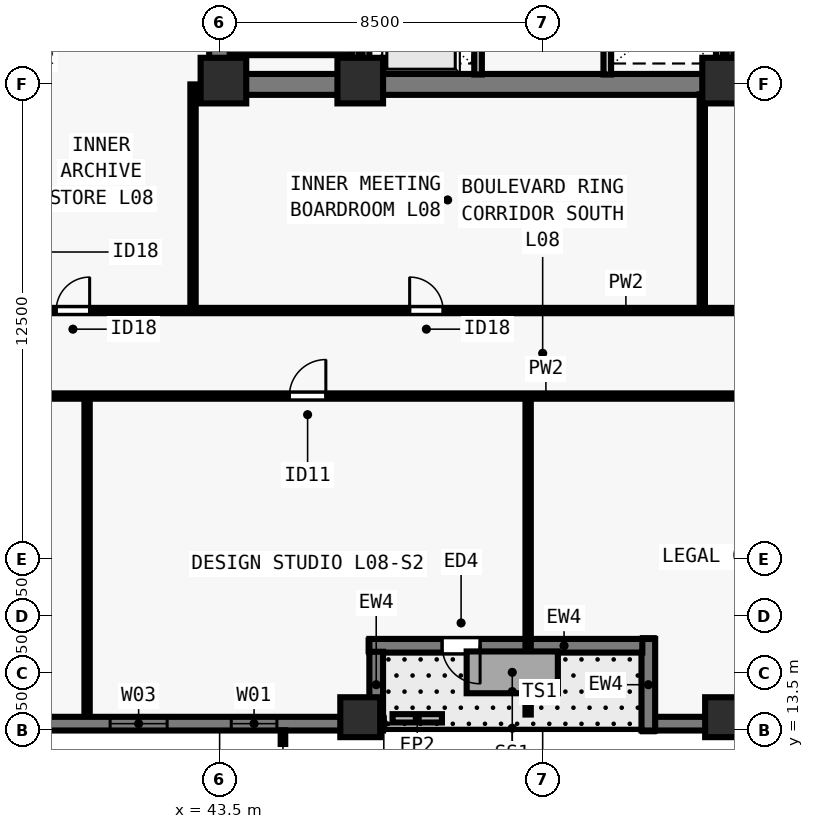
"""IFC4 building model, lengths in metres.
Left out: names, types, materials, properties, quantities, classifications, styles, units other than length and angle.
Written with IfcOpenShell. Run it as: python <this file> out.ifc"""

import sys

from ifc_helpers import new_model, si_unit, direction, frame, frame_2d, origin, origin_2d, place, context, subcontext, project, spatial, rectangle, extrude, element, fill, save


model = new_model("IFC4")
c1 = context("Model", 3, precision=1e-05, world=origin(), true_north=direction((0.0, 1.0)))
c2 = subcontext(c1, "Body", "Model", "MODEL_VIEW")
j1 = project(units=[si_unit("LENGTHUNIT", "METRE"), si_unit("PLANEANGLEUNIT", "RADIAN")], contexts=[c1])
p1 = place(None, origin())
s1 = spatial("IfcSite", under=j1, at=p1, CompositionType="ELEMENT")
p2 = place(p1, origin())
s2 = spatial("IfcBuilding", under=s1, at=p2, CompositionType="ELEMENT")
p3 = place(p2, frame((0.0, 0.0, 34.0)))
s3 = spatial("IfcBuildingStorey", under=s2, at=p3, CompositionType="ELEMENT", Elevation=34.0)
for number, where, z_axis, x_axis in (
    (1, (43.6, 30.6, 0.0), (0.0, 0.0, 1.0), (1.0, 0.0, 0.0)),
    (2, (47.2, 30.6, 0.0), (0.0, 0.0, 1.0), (1.0, 0.0, 0.0)),
    (3, (56.8, 30.6, 0.0), (0.0, 0.0, 1.0), (1.0, 0.0, 0.0)),
):
    element("IfcColumn", number, at=place(p3, frame(where, z_axis=z_axis, x_axis=x_axis)), inside=s3, PredefinedType="COLUMN", context=c2, shape_type="SweptSolid", body=[
        extrude(rectangle(XDim=1.2, YDim=1.2, at=origin_2d()), origin(), (0.0, 0.0, 1.0), 3.5),
    ])
for number, where, z_axis, x_axis in (
    (4, (47.2, 13.85, 0.0), (0.0, 0.0, 1.0), (1.0, 0.0, 0.0)),
    (5, (56.8, 13.85, 0.0), (0.0, 0.0, 1.0), (1.0, 0.0, 0.0)),
):
    element("IfcColumn", number, at=place(p3, frame(where, z_axis=z_axis, x_axis=x_axis)), inside=s3, PredefinedType="COLUMN", context=c2, shape_type="SweptSolid", body=[
        extrude(rectangle(XDim=1.05, YDim=1.05, at=origin_2d()), origin(), (0.0, 0.0, 1.0), 3.5),
    ])
p4 = place(p3, frame((47.8, 13.68, 0.0), z_axis=(0.0, 0.0, 1.0), x_axis=(-1.0, 0.0, 0.0)))
e6 = element("IfcWall", 6, at=p4, inside=s3, PredefinedType="SOLIDWALL", context=c2, shape_type="SweptSolid", body=[
    extrude(rectangle(XDim=17.962, YDim=0.36, at=frame_2d((8.981, 0.0))), origin(), (0.0, 0.0, 1.0), 3.28),
])
p5 = place(p4, frame((2.794, 0.0, 0.8)))
e7 = element("IfcOpeningElement", 7, at=p5, cuts=e6, PredefinedType="OPENING", context=c2, shape_type="SweptSolid", body=[
    extrude(rectangle(XDim=1.2, YDim=1.544, at=frame_2d((0.6, 0.772))), frame((0.0, 0.19, 0.0), z_axis=(0.0, -1.0, 0.0), x_axis=(1.0, 0.0, 0.0)), (0.0, 0.0, 1.0), 0.38),
])
p6 = place(p4, frame((5.681, 0.0, 0.8)))
e8 = element("IfcOpeningElement", 8, at=p6, cuts=e6, PredefinedType="OPENING", context=c2, shape_type="SweptSolid", body=[
    extrude(rectangle(XDim=1.5, YDim=1.544, at=frame_2d((0.75, 0.772))), frame((0.0, 0.19, 0.0), z_axis=(0.0, -1.0, 0.0), x_axis=(1.0, 0.0, 0.0)), (0.0, 0.0, 1.0), 0.38),
])
p7 = place(p4, frame((11.368, 0.0, 0.8)))
e9 = element("IfcOpeningElement", 9, at=p7, cuts=e6, PredefinedType="OPENING", context=c2, shape_type="SweptSolid", body=[
    extrude(rectangle(XDim=1.2, YDim=1.544, at=frame_2d((0.6, 0.772))), frame((0.0, 0.19, 0.0), z_axis=(0.0, -1.0, 0.0), x_axis=(1.0, 0.0, 0.0)), (0.0, 0.0, 1.0), 0.38),
])
p8 = place(p3, frame((74.5, 13.68, 0.0), z_axis=(0.0, 0.0, 1.0), x_axis=(-1.0, 0.0, 0.0)))
e10 = element("IfcWall", 10, at=p8, inside=s3, PredefinedType="SOLIDWALL", context=c2, shape_type="SweptSolid", body=[
    extrude(rectangle(XDim=19.562, YDim=0.36, at=frame_2d((9.781, 0.0))), origin(), (0.0, 0.0, 1.0), 3.28),
])
p9 = place(p8, frame((5.058, 0.0, 0.8)))
e11 = element("IfcOpeningElement", 11, at=p9, cuts=e10, PredefinedType="OPENING", context=c2, shape_type="SweptSolid", body=[
    extrude(rectangle(XDim=1.2, YDim=1.544, at=frame_2d((0.6, 0.772))), frame((0.0, 0.19, 0.0), z_axis=(0.0, -1.0, 0.0), x_axis=(1.0, 0.0, 0.0)), (0.0, 0.0, 1.0), 0.38),
])
p10 = place(p8, frame((7.273, 0.0, 0.8)))
e12 = element("IfcOpeningElement", 12, at=p10, cuts=e10, PredefinedType="OPENING", context=c2, shape_type="SweptSolid", body=[
    extrude(rectangle(XDim=1.5, YDim=1.544, at=frame_2d((0.75, 0.772))), frame((0.0, 0.19, 0.0), z_axis=(0.0, -1.0, 0.0), x_axis=(1.0, 0.0, 0.0)), (0.0, 0.0, 1.0), 0.38),
])
p11 = place(p8, frame((12.289, 0.0, 0.8)))
e13 = element("IfcOpeningElement", 13, at=p11, cuts=e10, PredefinedType="OPENING", context=c2, shape_type="SweptSolid", body=[
    extrude(rectangle(XDim=1.2, YDim=1.544, at=frame_2d((0.6, 0.772))), frame((0.0, 0.19, 0.0), z_axis=(0.0, -1.0, 0.0), x_axis=(1.0, 0.0, 0.0)), (0.0, 0.0, 1.0), 0.38),
])
p12 = place(p8, frame((15.304, 0.0, 0.8)))
e14 = element("IfcOpeningElement", 14, at=p12, cuts=e10, PredefinedType="OPENING", context=c2, shape_type="SweptSolid", body=[
    extrude(rectangle(XDim=1.5, YDim=1.544, at=frame_2d((0.75, 0.772))), frame((0.0, 0.19, 0.0), z_axis=(0.0, -1.0, 0.0), x_axis=(1.0, 0.0, 0.0)), (0.0, 0.0, 1.0), 0.38),
])
p13 = place(p3, frame((54.78, 13.5, 0.0), z_axis=(0.0, 0.0, 1.0), x_axis=(0.0, 1.0, 0.0)))
e15 = element("IfcWall", 15, at=p13, inside=s3, PredefinedType="SOLIDWALL", context=c2, shape_type="SweptSolid", body=[
    extrude(rectangle(XDim=2.41, YDim=0.36, at=frame_2d((1.205, 0.0))), origin(), (0.0, 0.0, 1.0), 3.28),
])
p14 = place(p3, frame((54.622, 15.73, 0.0), z_axis=(0.0, 0.0, 1.0), x_axis=(-1.0, 0.0, 0.0)))
e16 = element("IfcWall", 16, at=p14, inside=s3, PredefinedType="SOLIDWALL", context=c2, shape_type="SweptSolid", body=[
    extrude(rectangle(XDim=7.182, YDim=0.36, at=frame_2d((3.591, 0.0))), origin(), (0.0, 0.0, 1.0), 3.28),
])
p15 = place(p14, frame((4.268, 0.0, 0.0)))
e17 = element("IfcOpeningElement", 17, at=p15, cuts=e16, PredefinedType="OPENING", context=c2, shape_type="SweptSolid", body=[
    extrude(rectangle(XDim=1.0, YDim=2.15, at=frame_2d((0.5, 1.075))), frame((0.0, 0.19, 0.0), z_axis=(0.0, -1.0, 0.0), x_axis=(1.0, 0.0, 0.0)), (0.0, 0.0, 1.0), 0.38),
])
p16 = place(p3, frame((47.62, 15.572, 0.0), z_axis=(0.0, 0.0, 1.0), x_axis=(0.0, -1.0, 0.0)))
e18 = element("IfcWall", 18, at=p16, inside=s3, PredefinedType="SOLIDWALL", context=c2, shape_type="SweptSolid", body=[
    extrude(rectangle(XDim=1.734, YDim=0.36, at=frame_2d((0.867, 0.0))), origin(), (0.0, 0.0, 1.0), 3.28),
])
p17 = place(p3, frame((48.05, 13.82, 0.0), z_axis=(0.0, 0.0, 1.0), x_axis=(1.0, 0.0, 0.0)))
e19 = element("IfcWall", 19, at=p17, inside=s3, PredefinedType="PARAPET", context=c2, shape_type="SweptSolid", body=[
    extrude(rectangle(XDim=1.3, YDim=0.22, at=frame_2d((0.65, 0.0))), origin(), (0.0, 0.0, 1.0), 0.55),
])
p18 = place(p3, frame((43.225, 30.5, 0.0), z_axis=(0.0, 0.0, 1.0), x_axis=(1.0, 0.0, 0.0)))
e20 = element("IfcWall", 20, at=p18, inside=s3, PredefinedType="SHEAR", context=c2, shape_type="SweptSolid", body=[
    extrude(rectangle(XDim=17.55, YDim=0.55, at=frame_2d((8.775, 0.0))), origin(), (0.0, 0.0, 1.0), 3.28),
])
p19 = place(p3, frame((43.5, 30.765, 0.0), z_axis=(0.0, 0.0, 1.0), x_axis=(0.0, 1.0, 0.0)))
e21 = element("IfcWall", 21, at=p19, inside=s3, PredefinedType="SHEAR", context=c2, shape_type="SweptSolid", body=[
    extrude(rectangle(XDim=7.985, YDim=0.55, at=frame_2d((3.993, 0.0))), origin(), (0.0, 0.0, 1.0), 3.28),
])
p20 = place(p3, frame((50.3, 30.76, 0.0), z_axis=(0.0, 0.0, 1.0), x_axis=(0.0, 1.0, 0.0)))
e22 = element("IfcWall", 22, at=p20, inside=s3, PredefinedType="SOLIDWALL", context=c2, shape_type="SweptSolid", body=[
    extrude(rectangle(XDim=7.855, YDim=0.2, at=frame_2d((3.927, 0.0))), origin(), (0.0, 0.0, 1.0), 3.28),
])
p21 = place(p20, frame((0.79, 0.0, 0.0)))
e23 = element("IfcOpeningElement", 23, at=p21, cuts=e22, PredefinedType="OPENING", context=c2, shape_type="SweptSolid", body=[
    extrude(rectangle(XDim=1.1, YDim=2.2, at=frame_2d((0.55, 1.1))), frame((0.0, 0.11, 0.0), z_axis=(0.0, -1.0, 0.0), x_axis=(1.0, 0.0, 0.0)), (0.0, 0.0, 1.0), 0.22),
])
p22 = place(p20, frame((3.49, 0.0, 0.0)))
e24 = element("IfcOpeningElement", 24, at=p22, cuts=e22, PredefinedType="OPENING", context=c2, shape_type="SweptSolid", body=[
    extrude(rectangle(XDim=1.1, YDim=2.2, at=frame_2d((0.55, 1.1))), frame((0.0, 0.11, 0.0), z_axis=(0.0, -1.0, 0.0), x_axis=(1.0, 0.0, 0.0)), (0.0, 0.0, 1.0), 0.22),
])
p23 = place(p20, frame((6.19, 0.0, 0.0)))
e25 = element("IfcOpeningElement", 25, at=p23, cuts=e22, PredefinedType="OPENING", context=c2, shape_type="SweptSolid", body=[
    extrude(rectangle(XDim=1.1, YDim=2.2, at=frame_2d((0.55, 1.1))), frame((0.0, 0.11, 0.0), z_axis=(0.0, -1.0, 0.0), x_axis=(1.0, 0.0, 0.0)), (0.0, 0.0, 1.0), 0.22),
])
p24 = place(p3, frame((53.7, 30.76, 0.0), z_axis=(0.0, 0.0, 1.0), x_axis=(0.0, 1.0, 0.0)))
e26 = element("IfcWall", 26, at=p24, inside=s3, PredefinedType="SOLIDWALL", context=c2, shape_type="SweptSolid", body=[
    extrude(rectangle(XDim=7.855, YDim=0.2, at=frame_2d((3.927, 0.0))), origin(), (0.0, 0.0, 1.0), 3.28),
])
for number, where, z_axis, x_axis in (
    (27, (47.35, 30.76, 0.0), (0.0, 0.0, 1.0), (0.0, 1.0, 0.0)),
    (28, (56.65, 30.76, 0.0), (0.0, 0.0, 1.0), (0.0, 1.0, 0.0)),
):
    element("IfcWall", number, at=place(p3, frame(where, z_axis=z_axis, x_axis=x_axis)), inside=s3, PredefinedType="SOLIDWALL", context=c2, shape_type="SweptSolid", body=[
        extrude(rectangle(XDim=7.855, YDim=0.18, at=frame_2d((3.927, 0.0))), origin(), (0.0, 0.0, 1.0), 3.28),
    ])
p25 = place(p3, frame((35.75, 22.3, 0.0), z_axis=(0.0, 0.0, 1.0), x_axis=(1.0, 0.0, 0.0)))
e29 = element("IfcWall", 29, at=p25, inside=s3, PredefinedType="PARTITIONING", context=c2, shape_type="SweptSolid", body=[
    extrude(rectangle(XDim=32.5, YDim=0.14, at=frame_2d((16.25, 0.0))), origin(), (0.0, 0.0, 1.0), 3.28),
])
p26 = place(p25, frame((1.604, 0.0, 0.0)))
e30 = element("IfcOpeningElement", 30, at=p26, cuts=e29, PredefinedType="OPENING", context=c2, shape_type="SweptSolid", body=[
    extrude(rectangle(XDim=0.96, YDim=2.12, at=frame_2d((0.48, 1.06))), frame((0.0, 0.08, 0.0), z_axis=(0.0, -1.0, 0.0), x_axis=(1.0, 0.0, 0.0)), (0.0, 0.0, 1.0), 0.16),
])
p27 = place(p25, frame((9.585, 0.0, 0.0)))
e31 = element("IfcOpeningElement", 31, at=p27, cuts=e29, PredefinedType="OPENING", context=c2, shape_type="SweptSolid", body=[
    extrude(rectangle(XDim=0.96, YDim=2.12, at=frame_2d((0.48, 1.06))), frame((0.0, 0.08, 0.0), z_axis=(0.0, -1.0, 0.0), x_axis=(1.0, 0.0, 0.0)), (0.0, 0.0, 1.0), 0.16),
])
p28 = place(p25, frame((22.125, 0.0, 0.0)))
e32 = element("IfcOpeningElement", 32, at=p28, cuts=e29, PredefinedType="OPENING", context=c2, shape_type="SweptSolid", body=[
    extrude(rectangle(XDim=0.96, YDim=2.12, at=frame_2d((0.48, 1.06))), frame((0.0, 0.08, 0.0), z_axis=(0.0, -1.0, 0.0), x_axis=(1.0, 0.0, 0.0)), (0.0, 0.0, 1.0), 0.16),
])
p29 = place(p25, frame((31.18, 0.0, 0.0)))
e33 = element("IfcOpeningElement", 33, at=p29, cuts=e29, PredefinedType="OPENING", context=c2, shape_type="SweptSolid", body=[
    extrude(rectangle(XDim=0.96, YDim=2.12, at=frame_2d((0.48, 1.06))), frame((0.0, 0.08, 0.0), z_axis=(0.0, -1.0, 0.0), x_axis=(1.0, 0.0, 0.0)), (0.0, 0.0, 1.0), 0.16),
])
p30 = place(p3, frame((38.0, 24.55, 0.0), z_axis=(0.0, 0.0, 1.0), x_axis=(1.0, 0.0, 0.0)))
e34 = element("IfcWall", 34, at=p30, inside=s3, PredefinedType="PARTITIONING", context=c2, shape_type="SweptSolid", body=[
    extrude(rectangle(XDim=28.0, YDim=0.14, at=frame_2d((14.0, 0.0))), origin(), (0.0, 0.0, 1.0), 3.28),
])
p31 = place(p30, frame((1.2, 0.0, 0.0)))
e35 = element("IfcOpeningElement", 35, at=p31, cuts=e34, PredefinedType="OPENING", context=c2, shape_type="SweptSolid", body=[
    extrude(rectangle(XDim=0.88, YDim=2.1, at=frame_2d((0.44, 1.05))), frame((0.0, 0.08, 0.0), z_axis=(0.0, -1.0, 0.0), x_axis=(1.0, 0.0, 0.0)), (0.0, 0.0, 1.0), 0.16),
])
p32 = place(p30, frame((10.5, 0.0, 0.0)))
e36 = element("IfcOpeningElement", 36, at=p32, cuts=e34, PredefinedType="OPENING", context=c2, shape_type="SweptSolid", body=[
    extrude(rectangle(XDim=0.88, YDim=2.1, at=frame_2d((0.44, 1.05))), frame((0.0, 0.08, 0.0), z_axis=(0.0, -1.0, 0.0), x_axis=(1.0, 0.0, 0.0)), (0.0, 0.0, 1.0), 0.16),
])
p33 = place(p30, frame((21.0, 0.0, 0.0)))
e37 = element("IfcOpeningElement", 37, at=p33, cuts=e34, PredefinedType="OPENING", context=c2, shape_type="SweptSolid", body=[
    extrude(rectangle(XDim=0.88, YDim=2.1, at=frame_2d((0.44, 1.05))), frame((0.0, 0.08, 0.0), z_axis=(0.0, -1.0, 0.0), x_axis=(1.0, 0.0, 0.0)), (0.0, 0.0, 1.0), 0.16),
])
p34 = place(p3, frame((42.8, 24.605, 0.0), z_axis=(0.0, 0.0, 1.0), x_axis=(0.0, 1.0, 0.0)))
e38 = element("IfcWall", 38, at=p34, inside=s3, PredefinedType="PARTITIONING", context=c2, shape_type="SweptSolid", body=[
    extrude(rectangle(XDim=5.895, YDim=0.14, at=frame_2d((2.948, 0.0))), origin(), (0.0, 0.0, 1.0), 2.439),
])
p35 = place(p3, frame((56.2, 24.605, 0.0), z_axis=(0.0, 0.0, 1.0), x_axis=(0.0, 1.0, 0.0)))
e39 = element("IfcWall", 39, at=p35, inside=s3, PredefinedType="PARTITIONING", context=c2, shape_type="SweptSolid", body=[
    extrude(rectangle(XDim=5.635, YDim=0.14, at=frame_2d((2.817, 0.0))), origin(), (0.0, 0.0, 1.0), 2.849),
])
p36 = place(p3, frame((40.012, 13.92, 0.0), z_axis=(0.0, 0.0, 1.0), x_axis=(0.0, 1.0, 0.0)))
e40 = element("IfcWall", 40, at=p36, inside=s3, PredefinedType="PARTITIONING", context=c2, shape_type="SweptSolid", body=[
    extrude(rectangle(XDim=8.28, YDim=0.14, at=frame_2d((4.14, 0.0))), origin(), (0.0, 0.0, 1.0), 3.28),
])
p37 = place(p3, frame((51.617, 13.92, 0.0), z_axis=(0.0, 0.0, 1.0), x_axis=(0.0, 1.0, 0.0)))
e41 = element("IfcWall", 41, at=p37, inside=s3, PredefinedType="PARTITIONING", context=c2, shape_type="SweptSolid", body=[
    extrude(rectangle(XDim=8.28, YDim=0.14, at=frame_2d((4.14, 0.0))), origin(), (0.0, 0.0, 1.0), 2.849),
])
p38 = place(p3, frame((43.765, 31.36, 0.0), z_axis=(0.0, 0.0, 1.0), x_axis=(1.0, 0.0, 0.0)))
e42 = element("IfcWall", 42, at=p38, inside=s3, PredefinedType="SOLIDWALL", context=c2, shape_type="SweptSolid", body=[
    extrude(rectangle(XDim=3.23, YDim=0.18, at=frame_2d((1.615, 0.0))), origin(), (0.0, 0.0, 1.0), 3.28),
])
p39 = place(p3, frame((47.07, 38.78, 0.0), z_axis=(0.0, 0.0, 1.0), x_axis=(0.0, -1.0, 0.0)))
e43 = element("IfcWall", 43, at=p39, inside=s3, PredefinedType="SOLIDWALL", context=c2, shape_type="SweptSolid", body=[
    extrude(rectangle(XDim=8.017, YDim=0.18, at=frame_2d((4.009, 0.0))), origin(), (0.0, 0.0, 1.0), 3.28),
])
p40 = place(p3, frame((57.005, 31.36, 0.0), z_axis=(0.0, 0.0, 1.0), x_axis=(1.0, 0.0, 0.0)))
e44 = element("IfcWall", 44, at=p40, inside=s3, PredefinedType="SOLIDWALL", context=c2, shape_type="SweptSolid", body=[
    extrude(rectangle(XDim=3.23, YDim=0.18, at=frame_2d((1.615, 0.0))), origin(), (0.0, 0.0, 1.0), 3.28),
])
p41 = place(p3, frame((56.93, 38.78, 0.0), z_axis=(0.0, 0.0, 1.0), x_axis=(0.0, -1.0, 0.0)))
e45 = element("IfcWall", 45, at=p41, inside=s3, PredefinedType="SOLIDWALL", context=c2, shape_type="SweptSolid", body=[
    extrude(rectangle(XDim=8.017, YDim=0.18, at=frame_2d((4.009, 0.0))), origin(), (0.0, 0.0, 1.0), 3.28),
])
p42 = place(p5, origin())
e46 = element("IfcWindow", 46, at=p42, inside=s3, PartitioningType="SINGLE_PANEL", PredefinedType="WINDOW", context=c2, shape_type="SweptSolid", body=[
    extrude(rectangle(XDim=1.2, YDim=1.544, at=frame_2d((0.6, 0.772))), frame((0.0, -0.05, 0.0), z_axis=(0.0, -1.0, 0.0), x_axis=(1.0, 0.0, 0.0)), (0.0, 0.0, 1.0), 0.06),
])
fill(e7, e46)
p43 = place(p6, origin())
e47 = element("IfcWindow", 47, at=p43, inside=s3, PartitioningType="SINGLE_PANEL", PredefinedType="WINDOW", context=c2, shape_type="SweptSolid", body=[
    extrude(rectangle(XDim=1.5, YDim=1.544, at=frame_2d((0.75, 0.772))), frame((0.0, -0.05, 0.0), z_axis=(0.0, -1.0, 0.0), x_axis=(1.0, 0.0, 0.0)), (0.0, 0.0, 1.0), 0.06),
])
fill(e8, e47)
p44 = place(p15, origin())
e48 = element("IfcDoor", 48, at=p44, inside=s3, OperationType="SINGLE_SWING_LEFT", PredefinedType="DOOR", context=c2, shape_type="SweptSolid", body=[
    extrude(rectangle(XDim=1.0, YDim=2.15, at=frame_2d((0.5, 1.075))), frame((0.0, 0.025, 0.0), z_axis=(0.0, -1.0, 0.0), x_axis=(1.0, 0.0, 0.0)), (0.0, 0.0, 1.0), 0.05),
])
fill(e17, e48)
p45 = place(p31, origin())
e49 = element("IfcDoor", 49, at=p45, inside=s3, OperationType="SINGLE_SWING_RIGHT", PredefinedType="DOOR", context=c2, shape_type="SweptSolid", body=[
    extrude(rectangle(XDim=0.88, YDim=2.1, at=frame_2d((0.44, 1.05))), frame((0.0, 0.025, 0.0), z_axis=(0.0, -1.0, 0.0), x_axis=(1.0, 0.0, 0.0)), (0.0, 0.0, 1.0), 0.05),
])
fill(e35, e49)
p46 = place(p32, origin())
e50 = element("IfcDoor", 50, at=p46, inside=s3, OperationType="SINGLE_SWING_LEFT", PredefinedType="DOOR", context=c2, shape_type="SweptSolid", body=[
    extrude(rectangle(XDim=0.88, YDim=2.1, at=frame_2d((0.44, 1.05))), frame((0.0, 0.025, 0.0), z_axis=(0.0, -1.0, 0.0), x_axis=(1.0, 0.0, 0.0)), (0.0, 0.0, 1.0), 0.05),
])
fill(e36, e50)
p47 = place(p27, origin())
e51 = element("IfcDoor", 51, at=p47, inside=s3, OperationType="SINGLE_SWING_RIGHT", PredefinedType="DOOR", context=c2, shape_type="SweptSolid", body=[
    extrude(rectangle(XDim=0.96, YDim=2.12, at=frame_2d((0.48, 1.06))), frame((0.0, 0.025, 0.0), z_axis=(0.0, -1.0, 0.0), x_axis=(1.0, 0.0, 0.0)), (0.0, 0.0, 1.0), 0.05),
])
fill(e31, e51)
save(model, sys.argv[1])
